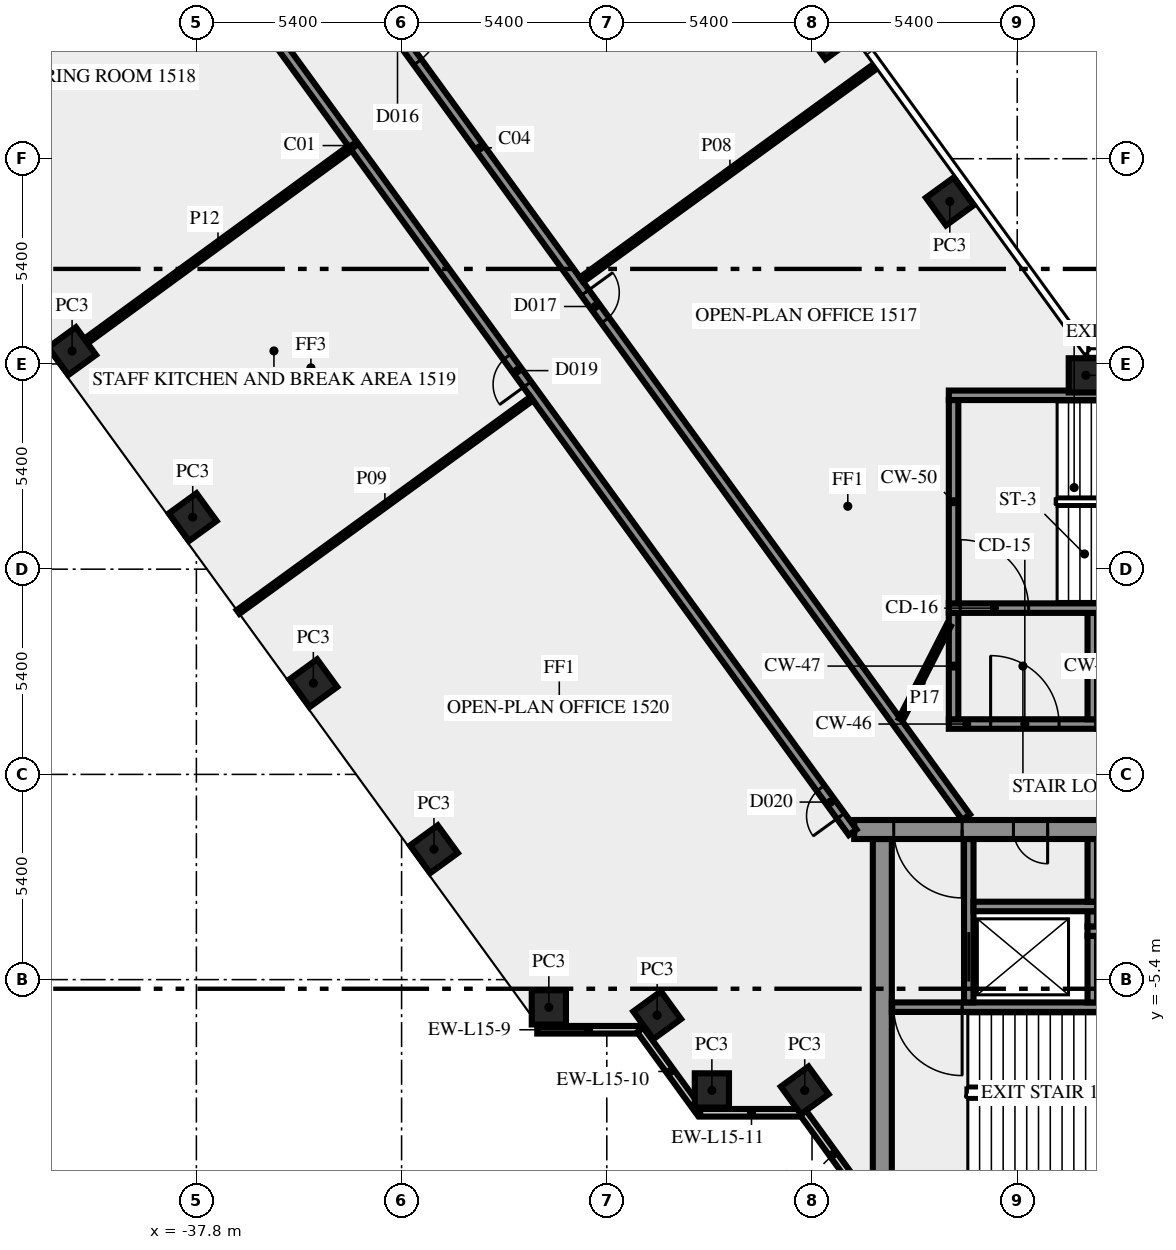
"""IFC4 building model, lengths in metres.
Left out: names, types, materials, properties, quantities, classifications, styles, units other than length and angle.
Written with IfcOpenShell. Run it as: python <this file> out.ifc"""

import sys

from ifc_helpers import new_model, si_unit, direction, frame, frame_2d, origin, origin_2d, place, context, subcontext, project, spatial, rectangle, extrude, element, fill, save


model = new_model("IFC4")
c1 = context("Model", 3, precision=1e-05, world=origin(), true_north=direction((0.0, 1.0)))
c2 = subcontext(c1, "Body", "Model", "MODEL_VIEW")
j1 = project(units=[si_unit("LENGTHUNIT", "METRE"), si_unit("PLANEANGLEUNIT", "RADIAN")], contexts=[c1])
p1 = place(None, origin())
s1 = spatial("IfcSite", under=j1, at=p1, CompositionType="ELEMENT")
p2 = place(p1, origin())
s2 = spatial("IfcBuilding", under=s1, at=p2, CompositionType="ELEMENT")
p3 = place(p2, frame((0.0, 0.0, 67.0)))
s3 = spatial("IfcBuildingStorey", under=s2, at=p3, CompositionType="ELEMENT", Elevation=67.0)
for number, where, z_axis, x_axis in (
    (1, (-17.974, 15.075, 0.0), (0.0, 0.0, 1.0), (-0.588, 0.809, 0.0)),
    (2, (-21.147, 19.444, 0.0), (0.0, 0.0, 1.0), (-0.588, 0.809, 0.0)),
    (3, (-41.07, 11.137, 0.0), (0.0, 0.0, 1.0), (0.588, -0.809, 0.0)),
    (4, (-37.896, 6.769, 0.0), (0.0, 0.0, 1.0), (0.588, -0.809, 0.0)),
    (5, (-34.722, 2.4, 0.0), (0.0, 0.0, 1.0), (0.588, -0.809, 0.0)),
    (6, (-31.548, -1.969, 0.0), (0.0, 0.0, 1.0), (0.588, -0.809, 0.0)),
    (7, (-28.525, -6.13, 0.0), (0.0, 0.0, 1.0), (1.0, 0.0, 0.0)),
    (8, (-25.674, -6.337, 0.0), (0.0, 0.0, 1.0), (0.588, -0.809, 0.0)),
    (9, (-24.235, -8.315, 0.0), (0.0, 0.0, 1.0), (1.0, 0.0, 0.0)),
    (10, (-21.792, -8.315, 0.0), (0.0, 0.0, 1.0), (0.588, -0.809, 0.0)),
    (11, (-14.395, 10.5, 0.0), (0.0, 0.0, 1.0), (-1.0, 0.0, 0.0)),
):
    element("IfcColumn", number, at=place(p3, frame(where, z_axis=z_axis, x_axis=x_axis)), inside=s3, PredefinedType="COLUMN", context=c2, shape_type="SweptSolid", body=[
        extrude(rectangle(XDim=0.9, YDim=0.9, at=origin_2d()), origin(), (0.0, 0.0, 1.0), 3.65),
    ])
p4 = place(p3, frame((-28.83, -6.719, 0.0), z_axis=(0.0, 0.0, 1.0), x_axis=(1.0, 0.0, 0.0)))
e12 = element("IfcWall", 12, at=p4, inside=s3, PredefinedType="SOLIDWALL", context=c2, shape_type="SweptSolid", body=[
    extrude(rectangle(XDim=2.7, YDim=0.2, at=frame_2d((1.35, 0.0))), origin(), (0.0, 0.0, 1.0), 3.65),
])
p5 = place(p3, frame((-26.12, -6.724, 0.0), z_axis=(0.0, 0.0, 1.0), x_axis=(0.587720002413, -0.809064397168, 0.0)))
e13 = element("IfcWall", 13, at=p5, inside=s3, PredefinedType="SOLIDWALL", context=c2, shape_type="SweptSolid", body=[
    extrude(rectangle(XDim=2.7, YDim=0.2, at=frame_2d((1.35, 0.0))), origin(), (0.0, 0.0, 1.0), 3.65),
])
p6 = place(p3, frame((-24.543, -8.904, 0.0), z_axis=(0.0, 0.0, 1.0), x_axis=(1.0, 0.0, 0.0)))
e14 = element("IfcWall", 14, at=p6, inside=s3, PredefinedType="SOLIDWALL", context=c2, shape_type="SweptSolid", body=[
    extrude(rectangle(XDim=2.7, YDim=0.2, at=frame_2d((1.35, 0.0))), origin(), (0.0, 0.0, 1.0), 3.65),
])
p7 = place(p3, frame((-21.833, -8.909, 0.0), z_axis=(0.0, 0.0, 1.0), x_axis=(0.587766567315, -0.809030569476, 0.0)))
e15 = element("IfcWall", 15, at=p7, inside=s3, PredefinedType="SOLIDWALL", context=c2, shape_type="SweptSolid", body=[
    extrude(rectangle(XDim=2.688, YDim=0.2, at=frame_2d((1.344, 0.0))), origin(), (0.0, 0.0, 1.0), 3.65),
])
p8 = place(p3, frame((-19.75, -10.5, 0.0), z_axis=(0.0, 0.0, 1.0), x_axis=(0.0, 1.0, 0.0)))
e16 = element("IfcWall", 16, at=p8, inside=s3, PredefinedType="SHEAR", context=c2, shape_type="SweptSolid", body=[
    extrude(rectangle(XDim=8.8, YDim=0.5, at=frame_2d((4.4, 0.0))), origin(), (0.0, 0.0, 1.0), 3.65),
])
p9 = place(p3, frame((-11.45, -6.125, 0.0), z_axis=(0.0, 0.0, 1.0), x_axis=(-1.0, 0.0, 0.0)))
e17 = element("IfcWall", 17, at=p9, inside=s3, PredefinedType="SHEAR", context=c2, shape_type="SweptSolid", body=[
    extrude(rectangle(XDim=8.05, YDim=0.25, at=frame_2d((4.025, 0.0))), origin(), (0.0, 0.0, 1.0), 3.65),
])
p10 = place(p9, frame((6.2, 0.0, 0.0)))
e18 = element("IfcOpeningElement", 18, at=p10, cuts=e17, PredefinedType="OPENING", context=c2, shape_type="SweptSolid", body=[
    extrude(rectangle(XDim=1.8, YDim=2.1, at=frame_2d((0.9, 1.05))), frame((0.0, 0.135, 0.0), z_axis=(0.0, -1.0, 0.0), x_axis=(1.0, 0.0, 0.0)), (0.0, 0.0, 1.0), 0.27),
])
p11 = place(p3, frame((-17.475, -6.0, 0.0), z_axis=(0.0, 0.0, 1.0), x_axis=(0.0, 1.0, 0.0)))
e19 = element("IfcWall", 19, at=p11, inside=s3, PredefinedType="SHEAR", context=c2, shape_type="SweptSolid", body=[
    extrude(rectangle(XDim=4.3, YDim=0.25, at=frame_2d((2.15, 0.0))), origin(), (0.0, 0.0, 1.0), 3.65),
])
p12 = place(p11, frame((0.55, 0.0, 0.0)))
e20 = element("IfcOpeningElement", 20, at=p12, cuts=e19, PredefinedType="OPENING", context=c2, shape_type="SweptSolid", body=[
    extrude(rectangle(XDim=1.3, YDim=2.1, at=frame_2d((0.65, 1.05))), frame((0.0, 0.135, 0.0), z_axis=(0.0, -1.0, 0.0), x_axis=(1.0, 0.0, 0.0)), (0.0, 0.0, 1.0), 0.27),
])
p13 = place(p3, frame((-14.225, -6.0, 0.0), z_axis=(0.0, 0.0, 1.0), x_axis=(0.0, 1.0, 0.0)))
e21 = element("IfcWall", 21, at=p13, inside=s3, PredefinedType="SHEAR", context=c2, shape_type="SweptSolid", body=[
    extrude(rectangle(XDim=1.75, YDim=0.25, at=frame_2d((0.875, 0.0))), origin(), (0.0, 0.0, 1.0), 3.65),
])
p14 = place(p3, frame((-14.35, -4.125, 0.0), z_axis=(0.0, 0.0, 1.0), x_axis=(1.0, 0.0, 0.0)))
e22 = element("IfcWall", 22, at=p14, inside=s3, PredefinedType="SHEAR", context=c2, shape_type="SweptSolid", body=[
    extrude(rectangle(XDim=10.4, YDim=0.25, at=frame_2d((5.2, 0.0))), origin(), (0.0, 0.0, 1.0), 3.65),
])
p15 = place(p14, frame((3.5, 0.0, 0.0)))
e23 = element("IfcOpeningElement", 23, at=p15, cuts=e22, PredefinedType="OPENING", context=c2, shape_type="SweptSolid", body=[
    extrude(rectangle(XDim=1.1, YDim=2.1, at=frame_2d((0.55, 1.05))), frame((0.0, 0.135, 0.0), z_axis=(0.0, -1.0, 0.0), x_axis=(1.0, 0.0, 0.0)), (0.0, 0.0, 1.0), 0.27),
])
p16 = place(p14, frame((6.0, 0.0, 0.0)))
e24 = element("IfcOpeningElement", 24, at=p16, cuts=e22, PredefinedType="OPENING", context=c2, shape_type="SweptSolid", body=[
    extrude(rectangle(XDim=1.1, YDim=2.1, at=frame_2d((0.55, 1.05))), frame((0.0, 0.135, 0.0), z_axis=(0.0, -1.0, 0.0), x_axis=(1.0, 0.0, 0.0)), (0.0, 0.0, 1.0), 0.27),
])
p17 = place(p14, frame((8.5, 0.0, 0.0)))
e25 = element("IfcOpeningElement", 25, at=p17, cuts=e22, PredefinedType="OPENING", context=c2, shape_type="SweptSolid", body=[
    extrude(rectangle(XDim=1.1, YDim=2.1, at=frame_2d((0.55, 1.05))), frame((0.0, 0.135, 0.0), z_axis=(0.0, -1.0, 0.0), x_axis=(1.0, 0.0, 0.0)), (0.0, 0.0, 1.0), 0.27),
])
p18 = place(p3, frame((-14.225, -4.0, 0.0), z_axis=(0.0, 0.0, 1.0), x_axis=(0.0, 1.0, 0.0)))
e26 = element("IfcWall", 26, at=p18, inside=s3, PredefinedType="SHEAR", context=c2, shape_type="SweptSolid", body=[
    extrude(rectangle(XDim=0.4, YDim=0.25, at=frame_2d((0.2, 0.0))), origin(), (0.0, 0.0, 1.0), 3.65),
])
p19 = place(p3, frame((-17.35, -3.475, 0.0), z_axis=(0.0, 0.0, 1.0), x_axis=(1.0, 0.0, 0.0)))
e27 = element("IfcWall", 27, at=p19, inside=s3, PredefinedType="SHEAR", context=c2, shape_type="SweptSolid", body=[
    extrude(rectangle(XDim=3.25, YDim=0.25, at=frame_2d((1.625, 0.0))), origin(), (0.0, 0.0, 1.0), 3.65),
])
p20 = place(p3, frame((-14.225, -3.35, 0.0), z_axis=(0.0, 0.0, 1.0), x_axis=(0.0, 1.0, 0.0)))
e28 = element("IfcWall", 28, at=p20, inside=s3, PredefinedType="SHEAR", context=c2, shape_type="SweptSolid", body=[
    extrude(rectangle(XDim=1.65, YDim=0.25, at=frame_2d((0.825, 0.0))), origin(), (0.0, 0.0, 1.0), 3.65),
])
p21 = place(p3, frame((20.49, -1.45, 0.0), z_axis=(0.0, 0.0, 1.0), x_axis=(-1.0, 0.0, 0.0)))
e29 = element("IfcWall", 29, at=p21, inside=s3, PredefinedType="SHEAR", context=c2, shape_type="SweptSolid", body=[
    extrude(rectangle(XDim=40.98, YDim=0.5, at=frame_2d((20.49, 0.0))), origin(), (0.0, 0.0, 1.0), 3.65),
])
p22 = place(p21, frame((38.14, 0.0, 0.0)))
e30 = element("IfcOpeningElement", 30, at=p22, cuts=e29, PredefinedType="OPENING", context=c2, shape_type="SweptSolid", body=[
    extrude(rectangle(XDim=1.8, YDim=2.1, at=frame_2d((0.9, 1.05))), frame((0.0, 0.26, 0.0), z_axis=(0.0, -1.0, 0.0), x_axis=(1.0, 0.0, 0.0)), (0.0, 0.0, 1.0), 0.52),
])
p23 = place(p21, frame((35.89, 0.0, 0.0)))
e31 = element("IfcOpeningElement", 31, at=p23, cuts=e29, PredefinedType="OPENING", context=c2, shape_type="SweptSolid", body=[
    extrude(rectangle(XDim=0.9, YDim=2.1, at=frame_2d((0.45, 1.05))), frame((0.0, 0.26, 0.0), z_axis=(0.0, -1.0, 0.0), x_axis=(1.0, 0.0, 0.0)), (0.0, 0.0, 1.0), 0.52),
])
p24 = place(p21, frame((32.94, 0.0, 0.0)))
e32 = element("IfcOpeningElement", 32, at=p24, cuts=e29, PredefinedType="OPENING", context=c2, shape_type="SweptSolid", body=[
    extrude(rectangle(XDim=0.9, YDim=2.1, at=frame_2d((0.45, 1.05))), frame((0.0, 0.26, 0.0), z_axis=(0.0, -1.0, 0.0), x_axis=(1.0, 0.0, 0.0)), (0.0, 0.0, 1.0), 0.52),
])
p25 = place(p21, frame((21.765, 0.0, 0.0)))
e33 = element("IfcOpeningElement", 33, at=p25, cuts=e29, PredefinedType="OPENING", context=c2, shape_type="SweptSolid", body=[
    extrude(rectangle(XDim=2.0, YDim=2.1, at=frame_2d((1.0, 1.05))), frame((0.0, 0.26, 0.0), z_axis=(0.0, -1.0, 0.0), x_axis=(1.0, 0.0, 0.0)), (0.0, 0.0, 1.0), 0.52),
])
p26 = place(p21, frame((7.14, 0.0, 0.0)))
e34 = element("IfcOpeningElement", 34, at=p26, cuts=e29, PredefinedType="OPENING", context=c2, shape_type="SweptSolid", body=[
    extrude(rectangle(XDim=0.9, YDim=2.1, at=frame_2d((0.45, 1.05))), frame((0.0, 0.26, 0.0), z_axis=(0.0, -1.0, 0.0), x_axis=(1.0, 0.0, 0.0)), (0.0, 0.0, 1.0), 0.52),
])
p27 = place(p21, frame((5.028, 0.0, 0.0)))
e35 = element("IfcOpeningElement", 35, at=p27, cuts=e29, PredefinedType="OPENING", context=c2, shape_type="SweptSolid", body=[
    extrude(rectangle(XDim=0.8, YDim=2.1, at=frame_2d((0.4, 1.05))), frame((0.0, 0.26, 0.0), z_axis=(0.0, -1.0, 0.0), x_axis=(1.0, 0.0, 0.0)), (0.0, 0.0, 1.0), 0.52),
])
p28 = place(p21, frame((3.452, 0.0, 0.0)))
e36 = element("IfcOpeningElement", 36, at=p28, cuts=e29, PredefinedType="OPENING", context=c2, shape_type="SweptSolid", body=[
    extrude(rectangle(XDim=0.8, YDim=2.1, at=frame_2d((0.4, 1.05))), frame((0.0, 0.26, 0.0), z_axis=(0.0, -1.0, 0.0), x_axis=(1.0, 0.0, 0.0)), (0.0, 0.0, 1.0), 0.52),
])
p29 = place(p21, frame((1.04, 0.0, 0.0)))
e37 = element("IfcOpeningElement", 37, at=p29, cuts=e29, PredefinedType="OPENING", context=c2, shape_type="SweptSolid", body=[
    extrude(rectangle(XDim=1.8, YDim=2.1, at=frame_2d((0.9, 1.05))), frame((0.0, 0.26, 0.0), z_axis=(0.0, -1.0, 0.0), x_axis=(1.0, 0.0, 0.0)), (0.0, 0.0, 1.0), 0.52),
])
p30 = place(p3, frame((-18.0, 1.325, 0.0), z_axis=(0.0, 0.0, 1.0), x_axis=(1.0, 0.0, 0.0)))
e38 = element("IfcWall", 38, at=p30, inside=s3, PredefinedType="SHEAR", context=c2, shape_type="SweptSolid", body=[
    extrude(rectangle(XDim=3.9, YDim=0.25, at=frame_2d((1.95, 0.0))), origin(), (0.0, 0.0, 1.0), 3.65),
])
p31 = place(p30, frame((1.1, 0.0, 0.0)))
e39 = element("IfcOpeningElement", 39, at=p31, cuts=e38, PredefinedType="OPENING", context=c2, shape_type="SweptSolid", body=[
    extrude(rectangle(XDim=1.8, YDim=2.1, at=frame_2d((0.9, 1.05))), frame((0.0, 0.135, 0.0), z_axis=(0.0, -1.0, 0.0), x_axis=(1.0, 0.0, 0.0)), (0.0, 0.0, 1.0), 0.27),
])
for number, where, z_axis, x_axis in (
    (40, (-17.875, 1.45, 0.0), (0.0, 0.0, 1.0), (0.0, 1.0, 0.0)),
    (41, (-14.225, 1.45, 0.0), (0.0, 0.0, 1.0), (0.0, 1.0, 0.0)),
):
    element("IfcWall", number, at=place(p3, frame(where, z_axis=z_axis, x_axis=x_axis)), inside=s3, PredefinedType="SHEAR", context=c2, shape_type="SweptSolid", body=[
        extrude(rectangle(XDim=2.8, YDim=0.25, at=frame_2d((1.4, 0.0))), origin(), (0.0, 0.0, 1.0), 3.65),
    ])
p32 = place(p3, frame((-18.0, 4.375, 0.0), z_axis=(0.0, 0.0, 1.0), x_axis=(1.0, 0.0, 0.0)))
e42 = element("IfcWall", 42, at=p32, inside=s3, PredefinedType="SHEAR", context=c2, shape_type="SweptSolid", body=[
    extrude(rectangle(XDim=10.5, YDim=0.25, at=frame_2d((5.25, 0.0))), origin(), (0.0, 0.0, 1.0), 3.65),
])
p33 = place(p32, frame((0.3, 0.0, 0.0)))
e43 = element("IfcOpeningElement", 43, at=p33, cuts=e42, PredefinedType="OPENING", context=c2, shape_type="SweptSolid", body=[
    extrude(rectangle(XDim=1.8, YDim=2.1, at=frame_2d((0.9, 1.05))), frame((0.0, 0.135, 0.0), z_axis=(0.0, -1.0, 0.0), x_axis=(1.0, 0.0, 0.0)), (0.0, 0.0, 1.0), 0.27),
])
p34 = place(p3, frame((-17.875, 4.5, 0.0), z_axis=(0.0, 0.0, 1.0), x_axis=(0.0, 1.0, 0.0)))
e44 = element("IfcWall", 44, at=p34, inside=s3, PredefinedType="SHEAR", context=c2, shape_type="SweptSolid", body=[
    extrude(rectangle(XDim=5.35, YDim=0.25, at=frame_2d((2.675, 0.0))), origin(), (0.0, 0.0, 1.0), 3.65),
])
p35 = place(p3, frame((-18.0, 9.975, 0.0), z_axis=(0.0, 0.0, 1.0), x_axis=(1.0, 0.0, 0.0)))
e45 = element("IfcWall", 45, at=p35, inside=s3, PredefinedType="SHEAR", context=c2, shape_type="SweptSolid", body=[
    extrude(rectangle(XDim=10.5, YDim=0.25, at=frame_2d((5.25, 0.0))), origin(), (0.0, 0.0, 1.0), 3.65),
])
p36 = place(p35, frame((4.5, 0.0, 1.0)))
e46 = element("IfcOpeningElement", 46, at=p36, cuts=e45, PredefinedType="OPENING", context=c2, shape_type="SweptSolid", body=[
    extrude(rectangle(XDim=1.2, YDim=1.2, at=frame_2d((0.6, 0.6))), frame((0.0, 0.135, 0.0), z_axis=(0.0, -1.0, 0.0), x_axis=(1.0, 0.0, 0.0)), (0.0, 0.0, 1.0), 0.27),
])
p37 = place(p3, frame((-20.531, -1.523, 0.0), z_axis=(0.0, 0.0, 1.0), x_axis=(-0.587784593204, 0.809017473231, 0.0)))
e47 = element("IfcWall", 47, at=p37, inside=s3, PredefinedType="SOLIDWALL", context=c2, shape_type="SweptSolid", body=[
    extrude(rectangle(XDim=44.67, YDim=0.25, at=frame_2d((22.335, 0.0))), origin(), (0.0, 0.0, 1.0), 3.65),
])
p38 = place(p37, frame((0.533, 0.0, 0.0)))
e48 = element("IfcOpeningElement", 48, at=p38, cuts=e47, PredefinedType="OPENING", context=c2, shape_type="SweptSolid", body=[
    extrude(rectangle(XDim=0.9, YDim=2.1, at=frame_2d((0.45, 1.05))), frame((0.0, 0.135, 0.0), z_axis=(0.0, -1.0, 0.0), x_axis=(1.0, 0.0, 0.0)), (0.0, 0.0, 1.0), 0.27),
])
p39 = place(p37, frame((32.531, 0.0, 0.0)))
e49 = element("IfcOpeningElement", 49, at=p39, cuts=e47, PredefinedType="OPENING", context=c2, shape_type="SweptSolid", body=[
    extrude(rectangle(XDim=1.8, YDim=2.1, at=frame_2d((0.9, 1.05))), frame((0.0, 0.135, 0.0), z_axis=(0.0, -1.0, 0.0), x_axis=(1.0, 0.0, 0.0)), (0.0, 0.0, 1.0), 0.27),
])
p40 = place(p37, frame((14.566, 0.0, 0.0)))
e50 = element("IfcOpeningElement", 50, at=p40, cuts=e47, PredefinedType="OPENING", context=c2, shape_type="SweptSolid", body=[
    extrude(rectangle(XDim=0.9, YDim=2.1, at=frame_2d((0.45, 1.05))), frame((0.0, 0.135, 0.0), z_axis=(0.0, -1.0, 0.0), x_axis=(1.0, 0.0, 0.0)), (0.0, 0.0, 1.0), 0.27),
])
p41 = place(p3, frame((-37.232, 25.972, 0.0), z_axis=(0.0, 0.0, 1.0), x_axis=(0.587786323093, -0.809016216391, 0.0)))
e51 = element("IfcWall", 51, at=p41, inside=s3, PredefinedType="SOLIDWALL", context=c2, shape_type="SweptSolid", body=[
    extrude(rectangle(XDim=33.493, YDim=0.25, at=frame_2d((16.747, 0.0))), origin(), (0.0, 0.0, 1.0), 3.65),
])
p42 = place(p41, frame((16.435, 0.0, 0.0)))
e52 = element("IfcOpeningElement", 52, at=p42, cuts=e51, PredefinedType="OPENING", context=c2, shape_type="SweptSolid", body=[
    extrude(rectangle(XDim=0.9, YDim=2.1, at=frame_2d((0.45, 1.05))), frame((0.0, 0.135, 0.0), z_axis=(0.0, -1.0, 0.0), x_axis=(1.0, 0.0, 0.0)), (0.0, 0.0, 1.0), 0.27),
])
p43 = place(p41, frame((7.137, 0.0, 0.0)))
e53 = element("IfcOpeningElement", 53, at=p43, cuts=e51, PredefinedType="OPENING", context=c2, shape_type="SweptSolid", body=[
    extrude(rectangle(XDim=1.8, YDim=2.1, at=frame_2d((0.9, 1.05))), frame((0.0, 0.135, 0.0), z_axis=(0.0, -1.0, 0.0), x_axis=(1.0, 0.0, 0.0)), (0.0, 0.0, 1.0), 0.27),
])
p44 = place(p3, frame((-19.857, 18.689, 0.0), z_axis=(0.0, 0.0, 1.0), x_axis=(-0.809002920164, -0.587804623294, 0.0)))
e54 = element("IfcWall", 54, at=p44, inside=s3, PredefinedType="PARTITIONING", context=c2, shape_type="SweptSolid", body=[
    extrude(rectangle(XDim=9.651, YDim=0.15, at=frame_2d((4.825, 0.0))), origin(), (0.0, 0.0, 1.0), 2.75),
])
p45 = place(p3, frame((-28.976, 9.888, 0.0), z_axis=(0.0, 0.0, 1.0), x_axis=(-0.808998008689, -0.58781138296, 0.0)))
e55 = element("IfcWall", 55, at=p45, inside=s3, PredefinedType="PARTITIONING", context=c2, shape_type="SweptSolid", body=[
    extrude(rectangle(XDim=9.55, YDim=0.12, at=frame_2d((4.775, 0.0))), origin(), (0.0, 0.0, 1.0), 2.75),
])
p46 = place(p3, frame((-40.702, 11.405, 0.0), z_axis=(0.0, 0.0, 1.0), x_axis=(0.807600812808, 0.58972953729, 0.0)))
e56 = element("IfcWall", 56, at=p46, inside=s3, PredefinedType="PARTITIONING", context=c2, shape_type="SweptSolid", body=[
    extrude(rectangle(XDim=8.595, YDim=0.15, at=frame_2d((4.297, 0.0))), origin(), (0.0, 0.0, 1.0), 3.65),
])
p47 = place(p3, frame((-19.261, 1.45, 0.0), z_axis=(0.0, 0.0, 1.0), x_axis=(0.453950796792, 0.891026752736, 0.0)))
e57 = element("IfcWall", 57, at=p47, inside=s3, PredefinedType="PARTITIONING", context=c2, shape_type="SweptSolid", body=[
    extrude(rectangle(XDim=2.778, YDim=0.12, at=frame_2d((1.389, 0.0))), origin(), (0.0, 0.0, 1.0), 3.65),
])
p48 = place(p10, origin())
e58 = element("IfcDoor", 58, at=p48, inside=s3, OperationType="DOUBLE_DOOR_SINGLE_SWING", PredefinedType="DOOR", context=c2, shape_type="SweptSolid", body=[
    extrude(rectangle(XDim=1.8, YDim=2.1, at=frame_2d((0.9, 1.05))), frame((0.0, 0.025, 0.0), z_axis=(0.0, -1.0, 0.0), x_axis=(1.0, 0.0, 0.0)), (0.0, 0.0, 1.0), 0.05),
])
fill(e18, e58)
p49 = place(p12, origin())
e59 = element("IfcDoor", 59, at=p49, inside=s3, OperationType="DOUBLE_DOOR_SLIDING", PredefinedType="DOOR", context=c2, shape_type="SweptSolid", body=[
    extrude(rectangle(XDim=1.3, YDim=2.1, at=frame_2d((0.65, 1.05))), frame((0.0, 0.025, 0.0), z_axis=(0.0, -1.0, 0.0), x_axis=(1.0, 0.0, 0.0)), (0.0, 0.0, 1.0), 0.05),
])
fill(e20, e59)
p50 = place(p22, origin())
e60 = element("IfcDoor", 60, at=p50, inside=s3, OperationType="DOUBLE_DOOR_SINGLE_SWING", PredefinedType="DOOR", context=c2, shape_type="SweptSolid", body=[
    extrude(rectangle(XDim=1.8, YDim=2.1, at=frame_2d((0.9, 1.05))), frame((0.0, 0.025, 0.0), z_axis=(0.0, -1.0, 0.0), x_axis=(1.0, 0.0, 0.0)), (0.0, 0.0, 1.0), 0.05),
])
fill(e30, e60)
p51 = place(p23, origin())
e61 = element("IfcDoor", 61, at=p51, inside=s3, OperationType="SINGLE_SWING_RIGHT", PredefinedType="DOOR", context=c2, shape_type="SweptSolid", body=[
    extrude(rectangle(XDim=0.9, YDim=2.1, at=frame_2d((0.45, 1.05))), frame((0.0, 0.025, 0.0), z_axis=(0.0, -1.0, 0.0), x_axis=(1.0, 0.0, 0.0)), (0.0, 0.0, 1.0), 0.05),
])
fill(e31, e61)
p52 = place(p31, origin())
e62 = element("IfcDoor", 62, at=p52, inside=s3, OperationType="DOUBLE_DOOR_SINGLE_SWING", PredefinedType="DOOR", context=c2, shape_type="SweptSolid", body=[
    extrude(rectangle(XDim=1.8, YDim=2.1, at=frame_2d((0.9, 1.05))), frame((0.0, 0.025, 0.0), z_axis=(0.0, -1.0, 0.0), x_axis=(1.0, 0.0, 0.0)), (0.0, 0.0, 1.0), 0.05),
])
fill(e39, e62)
p53 = place(p33, origin())
e63 = element("IfcDoor", 63, at=p53, inside=s3, OperationType="DOUBLE_DOOR_SINGLE_SWING", PredefinedType="DOOR", context=c2, shape_type="SweptSolid", body=[
    extrude(rectangle(XDim=1.8, YDim=2.1, at=frame_2d((0.9, 1.05))), frame((0.0, 0.025, 0.0), z_axis=(0.0, -1.0, 0.0), x_axis=(1.0, 0.0, 0.0)), (0.0, 0.0, 1.0), 0.05),
])
fill(e43, e63)
p54 = place(p42, origin())
e64 = element("IfcDoor", 64, at=p54, inside=s3, OperationType="SINGLE_SWING_LEFT", PredefinedType="DOOR", context=c2, shape_type="SweptSolid", body=[
    extrude(rectangle(XDim=0.9, YDim=2.1, at=frame_2d((0.45, 1.05))), frame((0.0, 0.025, 0.0), z_axis=(0.0, -1.0, 0.0), x_axis=(1.0, 0.0, 0.0)), (0.0, 0.0, 1.0), 0.05),
])
fill(e52, e64)
p55 = place(p38, origin())
e65 = element("IfcDoor", 65, at=p55, inside=s3, OperationType="SINGLE_SWING_LEFT", PredefinedType="DOOR", context=c2, shape_type="SweptSolid", body=[
    extrude(rectangle(XDim=0.9, YDim=2.1, at=frame_2d((0.45, 1.05))), frame((0.0, 0.025, 0.0), z_axis=(0.0, -1.0, 0.0), x_axis=(1.0, 0.0, 0.0)), (0.0, 0.0, 1.0), 0.05),
])
fill(e48, e65)
p56 = place(p43, origin())
e66 = element("IfcDoor", 66, at=p56, inside=s3, OperationType="DOUBLE_DOOR_SINGLE_SWING", PredefinedType="DOOR", context=c2, shape_type="SweptSolid", body=[
    extrude(rectangle(XDim=1.8, YDim=2.1, at=frame_2d((0.9, 1.05))), frame((0.0, 0.025, 0.0), z_axis=(0.0, -1.0, 0.0), x_axis=(1.0, 0.0, 0.0)), (0.0, 0.0, 1.0), 0.05),
])
fill(e53, e66)
p57 = place(p40, origin())
e67 = element("IfcDoor", 67, at=p57, inside=s3, OperationType="SINGLE_SWING_LEFT", PredefinedType="DOOR", context=c2, shape_type="SweptSolid", body=[
    extrude(rectangle(XDim=0.9, YDim=2.1, at=frame_2d((0.45, 1.05))), frame((0.0, 0.025, 0.0), z_axis=(0.0, -1.0, 0.0), x_axis=(1.0, 0.0, 0.0)), (0.0, 0.0, 1.0), 0.05),
])
fill(e50, e67)
save(model, sys.argv[1])
